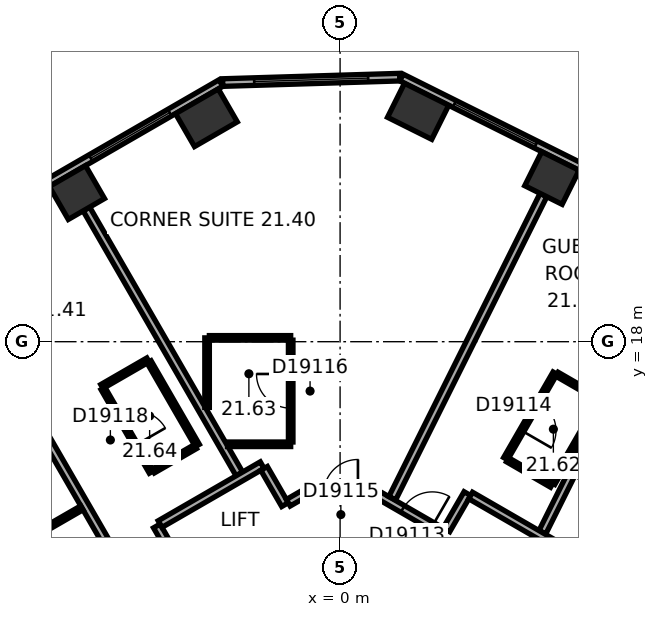
"""IFC4 building model, lengths in metres.
Left out: names, types, materials, properties, quantities, classifications, styles, units other than length and angle.
Written with IfcOpenShell. Run it as: python <this file> out.ifc"""

import sys

from ifc_helpers import new_model, si_unit, direction, frame, frame_2d, origin, origin_2d, place, context, subcontext, project, spatial, rectangle, extrude, element, fill, save


model = new_model("IFC4")
c1 = context("Model", 3, precision=1e-05, world=origin(), true_north=direction((0.0, 1.0)))
c2 = subcontext(c1, "Body", "Model", "MODEL_VIEW")
j1 = project(units=[si_unit("LENGTHUNIT", "METRE"), si_unit("PLANEANGLEUNIT", "RADIAN")], contexts=[c1])
p1 = place(None, origin())
s1 = spatial("IfcSite", under=j1, at=p1, CompositionType="ELEMENT")
p2 = place(p1, origin())
s2 = spatial("IfcBuilding", under=s1, at=p2, CompositionType="ELEMENT")
p3 = place(p2, frame((0.0, 0.0, 93.5)))
s3 = spatial("IfcBuildingStorey", under=s2, at=p3, CompositionType="ELEMENT", Elevation=93.5)
p4 = place(p3, frame((5.574, 22.306, 0.0), z_axis=(0.0, 0.0, 1.0), x_axis=(-0.894934361602, 0.44619781311, 0.0)))
e1 = element("IfcColumn", 1, at=p4, inside=s3, PredefinedType="COLUMN", context=c2, shape_type="SweptSolid", body=[
    extrude(rectangle(XDim=1.1, YDim=1.0, at=origin_2d()), origin(), (0.0, 0.0, 1.0), 3.3),
])
for number, where, z_axis, x_axis in (
    (2, (2.053, 24.062, 0.0), (0.0, 0.0, 1.0), (-0.895, 0.446, 0.0)),
    (3, (-3.518, 23.892, 0.0), (0.0, 0.0, 1.0), (-0.866, -0.5, 0.0)),
):
    element("IfcColumn", number, at=place(p3, frame(where, z_axis=z_axis, x_axis=x_axis)), inside=s3, PredefinedType="COLUMN", context=c2, shape_type="SweptSolid", body=[
        extrude(rectangle(XDim=1.3, YDim=1.0, at=origin_2d()), origin(), (0.0, 0.0, 1.0), 3.3),
    ])
p5 = place(p3, frame((-6.926, 21.925, 0.0), z_axis=(0.0, 0.0, 1.0), x_axis=(-0.866025403784, -0.5, 0.0)))
e4 = element("IfcColumn", 4, at=p5, inside=s3, PredefinedType="COLUMN", context=c2, shape_type="SweptSolid", body=[
    extrude(rectangle(XDim=1.1, YDim=1.0, at=origin_2d()), origin(), (0.0, 0.0, 1.0), 3.3),
])
p6 = place(p3, frame((20.63, 15.47, 0.0), z_axis=(0.0, 0.0, 1.0), x_axis=(-0.894934518609, 0.446197498203, 0.0)))
e5 = element("IfcWall", 5, at=p6, inside=s3, PredefinedType="STANDARD", context=c2, shape_type="SweptSolid", body=[
    extrude(rectangle(XDim=21.246, YDim=0.2, at=frame_2d((10.623, 0.0))), origin(), (0.0, 0.0, 1.0), 3.3),
])
p7 = place(p6, frame((1.553, 0.0, 0.8)))
e6 = element("IfcOpeningElement", 6, at=p7, cuts=e5, PredefinedType="OPENING", context=c2, shape_type="SweptSolid", body=[
    extrude(rectangle(XDim=2.4, YDim=1.7, at=frame_2d((1.2, 0.85))), frame((0.0, 0.11, 0.0), z_axis=(0.0, -1.0, 0.0), x_axis=(1.0, 0.0, 0.0)), (0.0, 0.0, 1.0), 0.22),
])
p8 = place(p6, frame((5.488, 0.0, 0.8)))
e7 = element("IfcOpeningElement", 7, at=p8, cuts=e5, PredefinedType="OPENING", context=c2, shape_type="SweptSolid", body=[
    extrude(rectangle(XDim=2.4, YDim=1.7, at=frame_2d((1.2, 0.85))), frame((0.0, 0.11, 0.0), z_axis=(0.0, -1.0, 0.0), x_axis=(1.0, 0.0, 0.0)), (0.0, 0.0, 1.0), 0.22),
])
p9 = place(p6, frame((9.422, 0.0, 0.8)))
e8 = element("IfcOpeningElement", 8, at=p9, cuts=e5, PredefinedType="OPENING", context=c2, shape_type="SweptSolid", body=[
    extrude(rectangle(XDim=2.4, YDim=1.7, at=frame_2d((1.2, 0.85))), frame((0.0, 0.11, 0.0), z_axis=(0.0, -1.0, 0.0), x_axis=(1.0, 0.0, 0.0)), (0.0, 0.0, 1.0), 0.22),
])
p10 = place(p6, frame((13.357, 0.0, 0.8)))
e9 = element("IfcOpeningElement", 9, at=p10, cuts=e5, PredefinedType="OPENING", context=c2, shape_type="SweptSolid", body=[
    extrude(rectangle(XDim=2.4, YDim=1.7, at=frame_2d((1.2, 0.85))), frame((0.0, 0.11, 0.0), z_axis=(0.0, -1.0, 0.0), x_axis=(1.0, 0.0, 0.0)), (0.0, 0.0, 1.0), 0.22),
])
p11 = place(p6, frame((17.292, 0.0, 0.8)))
e10 = element("IfcOpeningElement", 10, at=p11, cuts=e5, PredefinedType="OPENING", context=c2, shape_type="SweptSolid", body=[
    extrude(rectangle(XDim=2.4, YDim=1.7, at=frame_2d((1.2, 0.85))), frame((0.0, 0.11, 0.0), z_axis=(0.0, -1.0, 0.0), x_axis=(1.0, 0.0, 0.0)), (0.0, 0.0, 1.0), 0.22),
])
p12 = place(p3, frame((1.568, 24.961, 0.0), z_axis=(0.0, 0.0, 1.0), x_axis=(-0.999533359013, -0.030546099927, 0.0)))
e11 = element("IfcWall", 11, at=p12, inside=s3, PredefinedType="STANDARD", context=c2, shape_type="SweptSolid", body=[
    extrude(rectangle(XDim=4.66, YDim=0.2, at=frame_2d((2.33, 0.0))), origin(), (0.0, 0.0, 1.0), 3.3),
])
p13 = place(p12, frame((0.83, 0.0, 0.8)))
e12 = element("IfcOpeningElement", 12, at=p13, cuts=e11, PredefinedType="OPENING", context=c2, shape_type="SweptSolid", body=[
    extrude(rectangle(XDim=3.0, YDim=1.7, at=frame_2d((1.5, 0.85))), frame((0.0, 0.11, 0.0), z_axis=(0.0, -1.0, 0.0), x_axis=(1.0, 0.0, 0.0)), (0.0, 0.0, 1.0), 0.22),
])
p14 = place(p3, frame((-3.136, 24.805, 0.0), z_axis=(0.0, 0.0, 1.0), x_axis=(-0.866028291626, -0.499994998079, 0.0)))
e13 = element("IfcWall", 13, at=p14, inside=s3, PredefinedType="STANDARD", context=c2, shape_type="SweptSolid", body=[
    extrude(rectangle(XDim=21.246, YDim=0.2, at=frame_2d((10.623, 0.0))), origin(), (0.0, 0.0, 1.0), 3.3),
])
p15 = place(p14, frame((1.555, 0.0, 0.8)))
e14 = element("IfcOpeningElement", 14, at=p15, cuts=e13, PredefinedType="OPENING", context=c2, shape_type="SweptSolid", body=[
    extrude(rectangle(XDim=2.4, YDim=1.7, at=frame_2d((1.2, 0.85))), frame((0.0, 0.11, 0.0), z_axis=(0.0, -1.0, 0.0), x_axis=(1.0, 0.0, 0.0)), (0.0, 0.0, 1.0), 0.22),
])
p16 = place(p14, frame((5.489, 0.0, 0.8)))
e15 = element("IfcOpeningElement", 15, at=p16, cuts=e13, PredefinedType="OPENING", context=c2, shape_type="SweptSolid", body=[
    extrude(rectangle(XDim=2.4, YDim=1.7, at=frame_2d((1.2, 0.85))), frame((0.0, 0.11, 0.0), z_axis=(0.0, -1.0, 0.0), x_axis=(1.0, 0.0, 0.0)), (0.0, 0.0, 1.0), 0.22),
])
p17 = place(p14, frame((9.424, 0.0, 0.8)))
e16 = element("IfcOpeningElement", 16, at=p17, cuts=e13, PredefinedType="OPENING", context=c2, shape_type="SweptSolid", body=[
    extrude(rectangle(XDim=2.4, YDim=1.7, at=frame_2d((1.2, 0.85))), frame((0.0, 0.11, 0.0), z_axis=(0.0, -1.0, 0.0), x_axis=(1.0, 0.0, 0.0)), (0.0, 0.0, 1.0), 0.22),
])
p18 = place(p14, frame((13.358, 0.0, 0.8)))
e17 = element("IfcOpeningElement", 17, at=p18, cuts=e13, PredefinedType="OPENING", context=c2, shape_type="SweptSolid", body=[
    extrude(rectangle(XDim=2.4, YDim=1.7, at=frame_2d((1.2, 0.85))), frame((0.0, 0.11, 0.0), z_axis=(0.0, -1.0, 0.0), x_axis=(1.0, 0.0, 0.0)), (0.0, 0.0, 1.0), 0.22),
])
p19 = place(p14, frame((17.293, 0.0, 0.8)))
e18 = element("IfcOpeningElement", 18, at=p19, cuts=e13, PredefinedType="OPENING", context=c2, shape_type="SweptSolid", body=[
    extrude(rectangle(XDim=2.4, YDim=1.7, at=frame_2d((1.2, 0.85))), frame((0.0, 0.11, 0.0), z_axis=(0.0, -1.0, 0.0), x_axis=(1.0, 0.0, 0.0)), (0.0, 0.0, 1.0), 0.22),
])
p20 = place(p3, frame((-10.083, 19.524, 0.0), z_axis=(0.0, 0.0, 1.0), x_axis=(0.499999662836, -0.866025598446, 0.0)))
e19 = element("IfcWall", 19, at=p20, inside=s3, PredefinedType="PARTITIONING", context=c2, shape_type="SweptSolid", body=[
    extrude(rectangle(XDim=9.25, YDim=0.2, at=frame_2d((4.625, 0.0))), origin(), (0.0, 0.0, 1.0), 2.6),
])
p21 = place(p3, frame((-8.44, 12.679, 0.0), z_axis=(0.0, 0.0, 1.0), x_axis=(0.866044365799, 0.499967155389, 0.0)))
e20 = element("IfcWall", 20, at=p21, inside=s3, PredefinedType="PARTITIONING", context=c2, shape_type="SweptSolid", body=[
    extrude(rectangle(XDim=1.9, YDim=0.12, at=frame_2d((0.95, 0.0))), origin(), (0.0, 0.0, 1.0), 3.05),
])
p22 = place(p3, frame((-6.676, 21.492, 0.0), z_axis=(0.0, 0.0, 1.0), x_axis=(0.500011263043, -0.866018900966, 0.0)))
e21 = element("IfcWall", 21, at=p22, inside=s3, PredefinedType="PARTITIONING", context=c2, shape_type="SweptSolid", body=[
    extrude(rectangle(XDim=8.049, YDim=0.2, at=frame_2d((4.024, 0.0))), origin(), (0.0, 0.0, 1.0), 3.05),
])
p23 = place(p3, frame((-6.268, 16.82, 0.0), z_axis=(0.0, 0.0, 1.0), x_axis=(0.866002662425, 0.500039387122, 0.0)))
e22 = element("IfcWall", 22, at=p23, inside=s3, PredefinedType="PARTITIONING", context=c2, shape_type="SweptSolid", body=[
    extrude(rectangle(XDim=1.4, YDim=0.12, at=frame_2d((0.7, 0.0))), origin(), (0.0, 0.0, 1.0), 3.05),
])
p24 = place(p3, frame((-5.026, 17.469, 0.0), z_axis=(0.0, 0.0, 1.0), x_axis=(0.500005339912, -0.866022320763, 0.0)))
e23 = element("IfcWall", 23, at=p24, inside=s3, PredefinedType="PARTITIONING", context=c2, shape_type="SweptSolid", body=[
    extrude(rectangle(XDim=2.54, YDim=0.12, at=frame_2d((1.27, 0.0))), origin(), (0.0, 0.0, 1.0), 3.05),
])
p25 = place(p3, frame((-4.968, 14.569, 0.0), z_axis=(0.0, 0.0, 1.0), x_axis=(-0.500046963369, 0.865998287773, 0.0)))
e24 = element("IfcWall", 24, at=p25, inside=s3, PredefinedType="PARTITIONING", context=c2, shape_type="SweptSolid", body=[
    extrude(rectangle(XDim=2.54, YDim=0.12, at=frame_2d((1.27, 0.0))), origin(), (0.0, 0.0, 1.0), 3.05),
])
p26 = place(p25, frame((0.82, 0.0, 0.0)))
e25 = element("IfcOpeningElement", 25, at=p26, cuts=e24, PredefinedType="OPENING", context=c2, shape_type="SweptSolid", body=[
    extrude(rectangle(XDim=0.9, YDim=2.1, at=frame_2d((0.45, 1.05))), frame((0.0, 0.07, 0.0), z_axis=(0.0, -1.0, 0.0), x_axis=(1.0, 0.0, 0.0)), (0.0, 0.0, 1.0), 0.14),
])
p27 = place(p3, frame((-4.823, 13.152, 0.0), z_axis=(0.0, 0.0, 1.0), x_axis=(0.499986357472, -0.866033280158, 0.0)))
e26 = element("IfcWall", 26, at=p27, inside=s3, PredefinedType="PARTITIONING", context=c2, shape_type="SweptSolid", body=[
    extrude(rectangle(XDim=1.201, YDim=0.2, at=frame_2d((0.601, 0.0))), origin(), (0.0, 0.0, 1.0), 3.05),
])
p28 = place(p3, frame((-3.808, 15.239, 0.0), z_axis=(0.0, 0.0, 1.0), x_axis=(-0.866087136806, -0.499893060024, 0.0)))
e27 = element("IfcWall", 27, at=p28, inside=s3, PredefinedType="PARTITIONING", context=c2, shape_type="SweptSolid", body=[
    extrude(rectangle(XDim=1.28, YDim=0.12, at=frame_2d((0.64, 0.0))), origin(), (0.0, 0.0, 1.0), 3.05),
])
p29 = place(p3, frame((-3.5, 16.271, 0.0), z_axis=(0.0, 0.0, 1.0), x_axis=(0.0, 1.0, 0.0)))
e28 = element("IfcWall", 28, at=p29, inside=s3, PredefinedType="PARTITIONING", context=c2, shape_type="SweptSolid", body=[
    extrude(rectangle(XDim=1.829, YDim=0.12, at=frame_2d((0.915, 0.0))), origin(), (0.0, 0.0, 1.0), 3.05),
])
p30 = place(p3, frame((-3.44, 18.101, 0.0), z_axis=(0.0, 0.0, 1.0), x_axis=(1.0, 0.0, 0.0)))
e29 = element("IfcWall", 29, at=p30, inside=s3, PredefinedType="PARTITIONING", context=c2, shape_type="SweptSolid", body=[
    extrude(rectangle(XDim=2.14, YDim=0.12, at=frame_2d((1.07, 0.0))), origin(), (0.0, 0.0, 1.0), 3.05),
])
p31 = place(p3, frame((-2.05, 14.752, 0.0), z_axis=(0.0, 0.0, 1.0), x_axis=(-0.866030936828, -0.499990416364, 0.0)))
e30 = element("IfcWall", 30, at=p31, inside=s3, PredefinedType="PARTITIONING", context=c2, shape_type="SweptSolid", body=[
    extrude(rectangle(XDim=3.102, YDim=0.2, at=frame_2d((1.551, 0.0))), origin(), (0.0, 0.0, 1.0), 3.05),
])
p32 = place(p3, frame((-1.449, 13.712, 0.0), z_axis=(0.0, 0.0, 1.0), x_axis=(-0.499978356969, 0.866037899034, 0.0)))
e31 = element("IfcWall", 31, at=p32, inside=s3, PredefinedType="PARTITIONING", context=c2, shape_type="SweptSolid", body=[
    extrude(rectangle(XDim=1.101, YDim=0.2, at=frame_2d((0.551, 0.0))), origin(), (0.0, 0.0, 1.0), 3.05),
])
p33 = place(p3, frame((-1.3, 15.301, 0.0), z_axis=(0.0, 0.0, 1.0), x_axis=(-1.0, 0.0, 0.0)))
e32 = element("IfcWall", 32, at=p33, inside=s3, PredefinedType="PARTITIONING", context=c2, shape_type="SweptSolid", body=[
    extrude(rectangle(XDim=1.661, YDim=0.12, at=frame_2d((0.831, 0.0))), origin(), (0.0, 0.0, 1.0), 3.05),
])
p34 = place(p3, frame((-1.3, 18.041, 0.0), z_axis=(0.0, 0.0, 1.0), x_axis=(0.0, -1.0, 0.0)))
e33 = element("IfcWall", 33, at=p34, inside=s3, PredefinedType="PARTITIONING", context=c2, shape_type="SweptSolid", body=[
    extrude(rectangle(XDim=2.68, YDim=0.12, at=frame_2d((1.34, 0.0))), origin(), (0.0, 0.0, 1.0), 3.05),
])
p35 = place(p34, frame((0.89, 0.0, 0.0)))
e34 = element("IfcOpeningElement", 34, at=p35, cuts=e33, PredefinedType="OPENING", context=c2, shape_type="SweptSolid", body=[
    extrude(rectangle(XDim=0.9, YDim=2.1, at=frame_2d((0.45, 1.05))), frame((0.0, 0.07, 0.0), z_axis=(0.0, -1.0, 0.0), x_axis=(1.0, 0.0, 0.0)), (0.0, 0.0, 1.0), 0.14),
])
p36 = place(p3, frame((-0.95, 14.001, 0.0), z_axis=(0.0, 0.0, 1.0), x_axis=(-0.86609177584, -0.499885022602, 0.0)))
e35 = element("IfcWall", 35, at=p36, inside=s3, PredefinedType="PARTITIONING", context=c2, shape_type="SweptSolid", body=[
    extrude(rectangle(XDim=0.477, YDim=0.2, at=frame_2d((0.238, 0.0))), origin(), (0.0, 0.0, 1.0), 3.05),
])
p37 = place(p3, frame((0.95, 14.001, 0.0), z_axis=(0.0, 0.0, 1.0), x_axis=(-1.0, 0.0, 0.0)))
e36 = element("IfcWall", 36, at=p37, inside=s3, PredefinedType="PARTITIONING", context=c2, shape_type="SweptSolid", body=[
    extrude(rectangle(XDim=1.86, YDim=0.2, at=frame_2d((0.93, 0.0))), origin(), (0.0, 0.0, 1.0), 3.05),
])
p38 = place(p37, frame((0.48, 0.0, 0.0)))
e37 = element("IfcOpeningElement", 37, at=p38, cuts=e36, PredefinedType="OPENING", context=c2, shape_type="SweptSolid", body=[
    extrude(rectangle(XDim=0.9, YDim=2.1, at=frame_2d((0.45, 1.05))), frame((0.0, 0.11, 0.0), z_axis=(0.0, -1.0, 0.0), x_axis=(1.0, 0.0, 0.0)), (0.0, 0.0, 1.0), 0.22),
])
p39 = place(p3, frame((2.748, 12.962, 0.0), z_axis=(0.0, 0.0, 1.0), x_axis=(-0.866013897511, 0.50001992892, 0.0)))
e38 = element("IfcWall", 38, at=p39, inside=s3, PredefinedType="PARTITIONING", context=c2, shape_type="SweptSolid", body=[
    extrude(rectangle(XDim=2.037, YDim=0.2, at=frame_2d((1.018, 0.0))), origin(), (0.0, 0.0, 1.0), 3.05),
])
p40 = place(p39, frame((0.372, 0.0, 0.0)))
e39 = element("IfcOpeningElement", 39, at=p40, cuts=e38, PredefinedType="OPENING", context=c2, shape_type="SweptSolid", body=[
    extrude(rectangle(XDim=0.9, YDim=2.1, at=frame_2d((0.45, 1.05))), frame((0.0, 0.11, 0.0), z_axis=(0.0, -1.0, 0.0), x_axis=(1.0, 0.0, 0.0)), (0.0, 0.0, 1.0), 0.22),
])
p41 = place(p3, frame((3.349, 14.002, 0.0), z_axis=(0.0, 0.0, 1.0), x_axis=(-0.500074377092, -0.865982457891, 0.0)))
e40 = element("IfcWall", 40, at=p41, inside=s3, PredefinedType="PARTITIONING", context=c2, shape_type="SweptSolid", body=[
    extrude(rectangle(XDim=1.101, YDim=0.2, at=frame_2d((0.55, 0.0))), origin(), (0.0, 0.0, 1.0), 3.05),
])
p42 = place(p3, frame((4.356, 14.922, 0.0), z_axis=(0.0, 0.0, 1.0), x_axis=(0.499936506574, 0.866062058628, 0.0)))
e41 = element("IfcWall", 41, at=p42, inside=s3, PredefinedType="PARTITIONING", context=c2, shape_type="SweptSolid", body=[
    extrude(rectangle(XDim=2.6, YDim=0.12, at=frame_2d((1.3, 0.0))), origin(), (0.0, 0.0, 1.0), 3.05),
])
p43 = place(p42, frame((0.85, 0.0, 0.0)))
e42 = element("IfcOpeningElement", 42, at=p43, cuts=e41, PredefinedType="OPENING", context=c2, shape_type="SweptSolid", body=[
    extrude(rectangle(XDim=0.9, YDim=2.1, at=frame_2d((0.45, 1.05))), frame((0.0, 0.07, 0.0), z_axis=(0.0, -1.0, 0.0), x_axis=(1.0, 0.0, 0.0)), (0.0, 0.0, 1.0), 0.14),
])
p44 = place(p3, frame((5.351, 21.859, 0.0), z_axis=(0.0, 0.0, 1.0), x_axis=(-0.446205309328, -0.894930624086, 0.0)))
e43 = element("IfcWall", 43, at=p44, inside=s3, PredefinedType="PARTITIONING", context=c2, shape_type="SweptSolid", body=[
    extrude(rectangle(XDim=8.913, YDim=0.2, at=frame_2d((4.457, 0.0))), origin(), (0.0, 0.0, 1.0), 2.6),
])
p45 = place(p3, frame((5.569, 14.222, 0.0), z_axis=(0.0, 0.0, 1.0), x_axis=(-0.866036909293, 0.499980071345, 0.0)))
e44 = element("IfcWall", 44, at=p45, inside=s3, PredefinedType="PARTITIONING", context=c2, shape_type="SweptSolid", body=[
    extrude(rectangle(XDim=1.34, YDim=0.12, at=frame_2d((0.67, 0.0))), origin(), (0.0, 0.0, 1.0), 3.05),
])
p46 = place(p3, frame((5.708, 17.144, 0.0), z_axis=(0.0, 0.0, 1.0), x_axis=(0.866082447003, -0.499901185229, 0.0)))
e45 = element("IfcWall", 45, at=p46, inside=s3, PredefinedType="PARTITIONING", context=c2, shape_type="SweptSolid", body=[
    extrude(rectangle(XDim=1.34, YDim=0.12, at=frame_2d((0.67, 0.0))), origin(), (0.0, 0.0, 1.0), 3.05),
])
p47 = place(p3, frame((6.839, 16.422, 0.0), z_axis=(0.0, 0.0, 1.0), x_axis=(-0.50000366821, -0.866023285932, 0.0)))
e46 = element("IfcWall", 46, at=p47, inside=s3, PredefinedType="PARTITIONING", context=c2, shape_type="SweptSolid", body=[
    extrude(rectangle(XDim=2.48, YDim=0.12, at=frame_2d((1.24, 0.0))), origin(), (0.0, 0.0, 1.0), 3.05),
])
p48 = place(p3, frame((8.872, 20.104, 0.0), z_axis=(0.0, 0.0, 1.0), x_axis=(-0.446218378653, -0.894924107706, 0.0)))
e47 = element("IfcWall", 47, at=p48, inside=s3, PredefinedType="PARTITIONING", context=c2, shape_type="SweptSolid", body=[
    extrude(rectangle(XDim=7.95, YDim=0.2, at=frame_2d((3.975, 0.0))), origin(), (0.0, 0.0, 1.0), 3.05),
])
p49 = place(p3, frame((10.885, 9.652, 0.0), z_axis=(0.0, 0.0, 1.0), x_axis=(-0.866033868542, 0.499985338323, 0.0)))
e48 = element("IfcWall", 48, at=p49, inside=s3, PredefinedType="PARTITIONING", context=c2, shape_type="SweptSolid", body=[
    extrude(rectangle(XDim=8.602, YDim=0.2, at=frame_2d((4.301, 0.0))), origin(), (0.0, 0.0, 1.0), 3.05),
])
p50 = place(p49, frame((2.739, 0.0, 0.0)))
e49 = element("IfcOpeningElement", 49, at=p50, cuts=e48, PredefinedType="OPENING", context=c2, shape_type="SweptSolid", body=[
    extrude(rectangle(XDim=1.0, YDim=2.1, at=frame_2d((0.5, 1.05))), frame((0.0, 0.11, 0.0), z_axis=(0.0, -1.0, 0.0), x_axis=(1.0, 0.0, 0.0)), (0.0, 0.0, 1.0), 0.22),
])
p51 = place(p3, frame((12.866, 10.702, 0.0), z_axis=(0.0, 0.0, 1.0), x_axis=(-0.866023151433, 0.500003901167, 0.0)))
e50 = element("IfcWall", 50, at=p51, inside=s3, PredefinedType="PARTITIONING", context=c2, shape_type="SweptSolid", body=[
    extrude(rectangle(XDim=7.684, YDim=0.12, at=frame_2d((3.842, 0.0))), origin(), (0.0, 0.0, 1.0), 3.05),
])
p52 = place(p51, frame((0.55, 0.0, 0.0)))
e51 = element("IfcOpeningElement", 51, at=p52, cuts=e50, PredefinedType="OPENING", context=c2, shape_type="SweptSolid", body=[
    extrude(rectangle(XDim=1.0, YDim=2.1, at=frame_2d((0.5, 1.05))), frame((0.0, 0.07, 0.0), z_axis=(0.0, -1.0, 0.0), x_axis=(1.0, 0.0, 0.0)), (0.0, 0.0, 1.0), 0.14),
])
p53 = place(p51, frame((2.8, 0.0, 0.0)))
e52 = element("IfcOpeningElement", 52, at=p53, cuts=e50, PredefinedType="OPENING", context=c2, shape_type="SweptSolid", body=[
    extrude(rectangle(XDim=0.9, YDim=2.1, at=frame_2d((0.45, 1.05))), frame((0.0, 0.07, 0.0), z_axis=(0.0, -1.0, 0.0), x_axis=(1.0, 0.0, 0.0)), (0.0, 0.0, 1.0), 0.14),
])
p54 = place(p51, frame((5.592, 0.0, 0.0)))
e53 = element("IfcOpeningElement", 53, at=p54, cuts=e50, PredefinedType="OPENING", context=c2, shape_type="SweptSolid", body=[
    extrude(rectangle(XDim=0.9, YDim=2.1, at=frame_2d((0.45, 1.05))), frame((0.0, 0.07, 0.0), z_axis=(0.0, -1.0, 0.0), x_axis=(1.0, 0.0, 0.0)), (0.0, 0.0, 1.0), 0.14),
])
p55 = place(p11, origin())
e54 = element("IfcWindow", 54, at=p55, inside=s3, PartitioningType="SINGLE_PANEL", PredefinedType="WINDOW", context=c2, shape_type="SweptSolid", body=[
    extrude(rectangle(XDim=2.4, YDim=1.7, at=frame_2d((1.2, 0.85))), frame((0.0, 0.03, 0.0), z_axis=(0.0, -1.0, 0.0), x_axis=(1.0, 0.0, 0.0)), (0.0, 0.0, 1.0), 0.06),
])
fill(e10, e54)
p56 = place(p13, origin())
e55 = element("IfcWindow", 55, at=p56, inside=s3, PartitioningType="SINGLE_PANEL", PredefinedType="WINDOW", context=c2, shape_type="SweptSolid", body=[
    extrude(rectangle(XDim=3.0, YDim=1.7, at=frame_2d((1.5, 0.85))), frame((0.0, 0.03, 0.0), z_axis=(0.0, -1.0, 0.0), x_axis=(1.0, 0.0, 0.0)), (0.0, 0.0, 1.0), 0.06),
])
fill(e12, e55)
p57 = place(p15, origin())
e56 = element("IfcWindow", 56, at=p57, inside=s3, PartitioningType="SINGLE_PANEL", PredefinedType="WINDOW", context=c2, shape_type="SweptSolid", body=[
    extrude(rectangle(XDim=2.4, YDim=1.7, at=frame_2d((1.2, 0.85))), frame((0.0, 0.03, 0.0), z_axis=(0.0, -1.0, 0.0), x_axis=(1.0, 0.0, 0.0)), (0.0, 0.0, 1.0), 0.06),
])
fill(e14, e56)
p58 = place(p40, origin())
e57 = element("IfcDoor", 57, at=p58, inside=s3, OperationType="SINGLE_SWING_LEFT", PredefinedType="DOOR", context=c2, shape_type="SweptSolid", body=[
    extrude(rectangle(XDim=0.9, YDim=2.1, at=frame_2d((0.45, 1.05))), frame((0.0, 0.025, 0.0), z_axis=(0.0, -1.0, 0.0), x_axis=(1.0, 0.0, 0.0)), (0.0, 0.0, 1.0), 0.05),
])
fill(e39, e57)
p59 = place(p43, origin())
e58 = element("IfcDoor", 58, at=p59, inside=s3, OperationType="SINGLE_SWING_LEFT", PredefinedType="DOOR", context=c2, shape_type="SweptSolid", body=[
    extrude(rectangle(XDim=0.9, YDim=2.1, at=frame_2d((0.45, 1.05))), frame((0.0, 0.025, 0.0), z_axis=(0.0, -1.0, 0.0), x_axis=(1.0, 0.0, 0.0)), (0.0, 0.0, 1.0), 0.05),
])
fill(e42, e58)
p60 = place(p38, origin())
e59 = element("IfcDoor", 59, at=p60, inside=s3, OperationType="SINGLE_SWING_LEFT", PredefinedType="DOOR", context=c2, shape_type="SweptSolid", body=[
    extrude(rectangle(XDim=0.9, YDim=2.1, at=frame_2d((0.45, 1.05))), frame((0.0, 0.025, 0.0), z_axis=(0.0, -1.0, 0.0), x_axis=(1.0, 0.0, 0.0)), (0.0, 0.0, 1.0), 0.05),
])
fill(e37, e59)
p61 = place(p35, origin())
e60 = element("IfcDoor", 60, at=p61, inside=s3, OperationType="SINGLE_SWING_LEFT", PredefinedType="DOOR", context=c2, shape_type="SweptSolid", body=[
    extrude(rectangle(XDim=0.9, YDim=2.1, at=frame_2d((0.45, 1.05))), frame((0.0, 0.025, 0.0), z_axis=(0.0, -1.0, 0.0), x_axis=(1.0, 0.0, 0.0)), (0.0, 0.0, 1.0), 0.05),
])
fill(e34, e60)
p62 = place(p26, origin())
e61 = element("IfcDoor", 61, at=p62, inside=s3, OperationType="SINGLE_SWING_LEFT", PredefinedType="DOOR", context=c2, shape_type="SweptSolid", body=[
    extrude(rectangle(XDim=0.9, YDim=2.1, at=frame_2d((0.45, 1.05))), frame((0.0, 0.025, 0.0), z_axis=(0.0, -1.0, 0.0), x_axis=(1.0, 0.0, 0.0)), (0.0, 0.0, 1.0), 0.05),
])
fill(e25, e61)
save(model, sys.argv[1])
